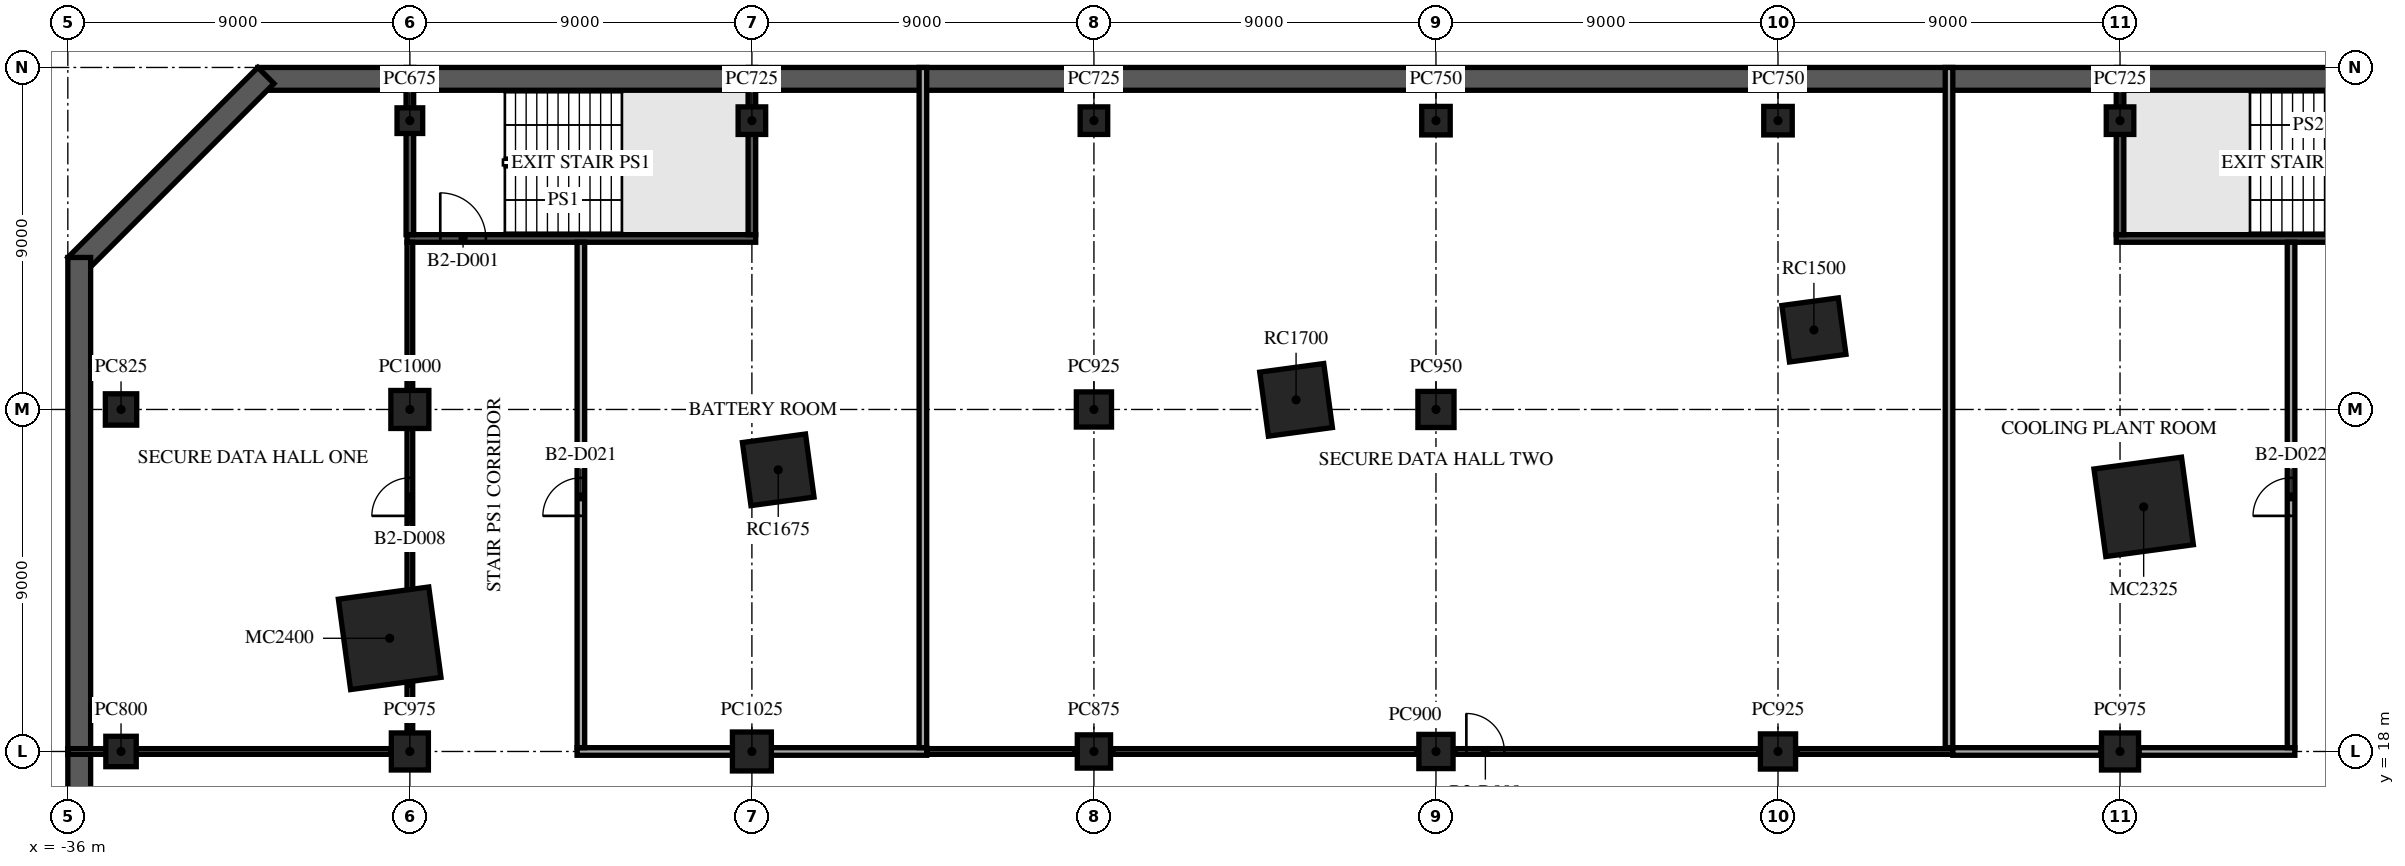
"""IFC4 building model, lengths in metres.
Left out: names, types, materials, properties, quantities, classifications, styles, units other than length and angle.
Written with IfcOpenShell. Run it as: python <this file> out.ifc"""

import sys

from ifc_helpers import new_model, si_unit, direction, frame, frame_2d, origin, origin_2d, place, context, subcontext, project, spatial, rectangle, extrude, element, fill, save


model = new_model("IFC4")
c1 = context("Model", 3, precision=1e-05, world=origin(), true_north=direction((0.0, 1.0)))
c2 = subcontext(c1, "Body", "Model", "MODEL_VIEW")
j1 = project(units=[si_unit("LENGTHUNIT", "METRE"), si_unit("PLANEANGLEUNIT", "RADIAN")], contexts=[c1])
p1 = place(None, origin())
s1 = spatial("IfcSite", under=j1, at=p1, CompositionType="ELEMENT")
p2 = place(p1, origin())
s2 = spatial("IfcBuilding", under=s1, at=p2, CompositionType="ELEMENT")
p3 = place(p2, frame((0.0, 0.0, -9.0)))
s3 = spatial("IfcBuildingStorey", under=s2, at=p3, CompositionType="ELEMENT", Elevation=-9.0)
p4 = place(p3, frame((31.0, 35.7, -0.3), z_axis=(0.0, 0.0, 1.0), x_axis=(-1.0, 0.0, 0.0)))
e1 = element("IfcWall", 1, at=p4, inside=s3, PredefinedType="SOLIDWALL", context=c2, shape_type="SweptSolid", body=[
    extrude(rectangle(XDim=62.0, YDim=0.6, at=frame_2d((31.0, 0.0))), origin(), (0.0, 0.0, 1.0), 4.5),
])
p5 = place(p3, frame((-30.788, 35.788, -0.3), z_axis=(0.0, 0.0, 1.0), x_axis=(-0.707106781187, -0.707106781187, 0.0)))
e2 = element("IfcWall", 2, at=p5, inside=s3, PredefinedType="SOLIDWALL", context=c2, shape_type="SweptSolid", body=[
    extrude(rectangle(XDim=7.071, YDim=0.6, at=frame_2d((3.536, 0.0))), origin(), (0.0, 0.0, 1.0), 4.5),
])
p6 = place(p3, frame((-35.7, 31.0, -0.3), z_axis=(0.0, 0.0, 1.0), x_axis=(0.0, -1.0, 0.0)))
e3 = element("IfcWall", 3, at=p6, inside=s3, PredefinedType="SOLIDWALL", context=c2, shape_type="SweptSolid", body=[
    extrude(rectangle(XDim=62.0, YDim=0.6, at=frame_2d((31.0, 0.0))), origin(), (0.0, 0.0, 1.0), 4.5),
])
p7 = place(p3, frame((-34.6, 18.0, -0.3), z_axis=(0.0, 0.0, 1.0), x_axis=(1.0, 0.0, 0.0)))
e4 = element("IfcColumn", 4, at=p7, inside=s3, PredefinedType="COLUMN", context=c2, shape_type="SweptSolid", body=[
    extrude(rectangle(XDim=0.8, YDim=0.8, at=origin_2d()), origin(), (0.0, 0.0, 1.0), 4.8),
])
p8 = place(p3, frame((-34.6, 27.0, -0.3), z_axis=(0.0, 0.0, 1.0), x_axis=(1.0, 0.0, 0.0)))
e5 = element("IfcColumn", 5, at=p8, inside=s3, PredefinedType="COLUMN", context=c2, shape_type="SweptSolid", body=[
    extrude(rectangle(XDim=0.825, YDim=0.825, at=origin_2d()), origin(), (0.0, 0.0, 1.0), 4.8),
])
p9 = place(p3, frame((-27.0, 18.0, -0.3), z_axis=(0.0, 0.0, 1.0), x_axis=(1.0, 0.0, 0.0)))
e6 = element("IfcColumn", 6, at=p9, inside=s3, PredefinedType="COLUMN", context=c2, shape_type="SweptSolid", body=[
    extrude(rectangle(XDim=0.975, YDim=0.975, at=origin_2d()), origin(), (0.0, 0.0, 1.0), 4.8),
])
p10 = place(p3, frame((-27.0, 27.0, -0.3), z_axis=(0.0, 0.0, 1.0), x_axis=(1.0, 0.0, 0.0)))
e7 = element("IfcColumn", 7, at=p10, inside=s3, PredefinedType="COLUMN", context=c2, shape_type="SweptSolid", body=[
    extrude(rectangle(XDim=1.0, YDim=1.0, at=origin_2d()), origin(), (0.0, 0.0, 1.0), 4.8),
])
p11 = place(p3, frame((-27.0, 34.6, -0.3), z_axis=(0.0, 0.0, 1.0), x_axis=(1.0, 0.0, 0.0)))
e8 = element("IfcColumn", 8, at=p11, inside=s3, PredefinedType="COLUMN", context=c2, shape_type="SweptSolid", body=[
    extrude(rectangle(XDim=0.675, YDim=0.675, at=origin_2d()), origin(), (0.0, 0.0, 1.0), 4.8),
])
p12 = place(p3, frame((-18.0, 18.0, -0.3), z_axis=(0.0, 0.0, 1.0), x_axis=(1.0, 0.0, 0.0)))
e9 = element("IfcColumn", 9, at=p12, inside=s3, PredefinedType="COLUMN", context=c2, shape_type="SweptSolid", body=[
    extrude(rectangle(XDim=1.025, YDim=1.025, at=origin_2d()), origin(), (0.0, 0.0, 1.0), 4.8),
])
p13 = place(p3, frame((-18.0, 34.6, -0.3), z_axis=(0.0, 0.0, 1.0), x_axis=(1.0, 0.0, 0.0)))
e10 = element("IfcColumn", 10, at=p13, inside=s3, PredefinedType="COLUMN", context=c2, shape_type="SweptSolid", body=[
    extrude(rectangle(XDim=0.725, YDim=0.725, at=origin_2d()), origin(), (0.0, 0.0, 1.0), 4.8),
])
p14 = place(p3, frame((-9.0, 18.0, -0.3), z_axis=(0.0, 0.0, 1.0), x_axis=(1.0, 0.0, 0.0)))
e11 = element("IfcColumn", 11, at=p14, inside=s3, PredefinedType="COLUMN", context=c2, shape_type="SweptSolid", body=[
    extrude(rectangle(XDim=0.875, YDim=0.875, at=origin_2d()), origin(), (0.0, 0.0, 1.0), 4.8),
])
p15 = place(p3, frame((-9.0, 27.0, -0.3), z_axis=(0.0, 0.0, 1.0), x_axis=(1.0, 0.0, 0.0)))
e12 = element("IfcColumn", 12, at=p15, inside=s3, PredefinedType="COLUMN", context=c2, shape_type="SweptSolid", body=[
    extrude(rectangle(XDim=0.925, YDim=0.925, at=origin_2d()), origin(), (0.0, 0.0, 1.0), 4.8),
])
p16 = place(p3, frame((-9.0, 34.6, -0.3), z_axis=(0.0, 0.0, 1.0), x_axis=(1.0, 0.0, 0.0)))
e13 = element("IfcColumn", 13, at=p16, inside=s3, PredefinedType="COLUMN", context=c2, shape_type="SweptSolid", body=[
    extrude(rectangle(XDim=0.725, YDim=0.725, at=origin_2d()), origin(), (0.0, 0.0, 1.0), 4.8),
])
p17 = place(p3, frame((0.0, 18.0, -0.3), z_axis=(0.0, 0.0, 1.0), x_axis=(1.0, 0.0, 0.0)))
e14 = element("IfcColumn", 14, at=p17, inside=s3, PredefinedType="COLUMN", context=c2, shape_type="SweptSolid", body=[
    extrude(rectangle(XDim=0.9, YDim=0.9, at=origin_2d()), origin(), (0.0, 0.0, 1.0), 4.8),
])
p18 = place(p3, frame((0.0, 27.0, -0.3), z_axis=(0.0, 0.0, 1.0), x_axis=(1.0, 0.0, 0.0)))
e15 = element("IfcColumn", 15, at=p18, inside=s3, PredefinedType="COLUMN", context=c2, shape_type="SweptSolid", body=[
    extrude(rectangle(XDim=0.95, YDim=0.95, at=origin_2d()), origin(), (0.0, 0.0, 1.0), 4.8),
])
p19 = place(p3, frame((0.0, 34.6, -0.3), z_axis=(0.0, 0.0, 1.0), x_axis=(1.0, 0.0, 0.0)))
e16 = element("IfcColumn", 16, at=p19, inside=s3, PredefinedType="COLUMN", context=c2, shape_type="SweptSolid", body=[
    extrude(rectangle(XDim=0.75, YDim=0.75, at=origin_2d()), origin(), (0.0, 0.0, 1.0), 4.8),
])
p20 = place(p3, frame((9.0, 18.0, -0.3), z_axis=(0.0, 0.0, 1.0), x_axis=(1.0, 0.0, 0.0)))
e17 = element("IfcColumn", 17, at=p20, inside=s3, PredefinedType="COLUMN", context=c2, shape_type="SweptSolid", body=[
    extrude(rectangle(XDim=0.925, YDim=0.925, at=origin_2d()), origin(), (0.0, 0.0, 1.0), 4.8),
])
p21 = place(p3, frame((9.0, 34.6, -0.3), z_axis=(0.0, 0.0, 1.0), x_axis=(1.0, 0.0, 0.0)))
e18 = element("IfcColumn", 18, at=p21, inside=s3, PredefinedType="COLUMN", context=c2, shape_type="SweptSolid", body=[
    extrude(rectangle(XDim=0.75, YDim=0.75, at=origin_2d()), origin(), (0.0, 0.0, 1.0), 4.8),
])
p22 = place(p3, frame((18.0, 18.0, -0.3), z_axis=(0.0, 0.0, 1.0), x_axis=(1.0, 0.0, 0.0)))
e19 = element("IfcColumn", 19, at=p22, inside=s3, PredefinedType="COLUMN", context=c2, shape_type="SweptSolid", body=[
    extrude(rectangle(XDim=0.975, YDim=0.975, at=origin_2d()), origin(), (0.0, 0.0, 1.0), 4.8),
])
p23 = place(p3, frame((18.0, 34.6, -0.3), z_axis=(0.0, 0.0, 1.0), x_axis=(1.0, 0.0, 0.0)))
e20 = element("IfcColumn", 20, at=p23, inside=s3, PredefinedType="COLUMN", context=c2, shape_type="SweptSolid", body=[
    extrude(rectangle(XDim=0.725, YDim=0.725, at=origin_2d()), origin(), (0.0, 0.0, 1.0), 4.8),
])
p24 = place(p3, frame((18.622, 24.437, -0.3), z_axis=(0.0, 0.0, 1.0), x_axis=(0.991001197216, 0.133853005627, 0.0)))
e21 = element("IfcColumn", 21, at=p24, inside=s3, PredefinedType="COLUMN", context=c2, shape_type="SweptSolid", body=[
    extrude(rectangle(XDim=2.325, YDim=2.325, at=origin_2d()), origin(), (0.0, 0.0, 1.0), 4.8),
])
p25 = place(p3, frame((9.945, 29.093, -0.3), z_axis=(0.0, 0.0, 1.0), x_axis=(0.991001197216, 0.133853005627, 0.0)))
e22 = element("IfcColumn", 22, at=p25, inside=s3, PredefinedType="COLUMN", context=c2, shape_type="SweptSolid", body=[
    extrude(rectangle(XDim=1.5, YDim=1.5, at=origin_2d()), origin(), (0.0, 0.0, 1.0), 4.8),
])
p26 = place(p3, frame((-3.681, 27.253, -0.3), z_axis=(0.0, 0.0, 1.0), x_axis=(0.991001197216, 0.133853005627, 0.0)))
e23 = element("IfcColumn", 23, at=p26, inside=s3, PredefinedType="COLUMN", context=c2, shape_type="SweptSolid", body=[
    extrude(rectangle(XDim=1.7, YDim=1.7, at=origin_2d()), origin(), (0.0, 0.0, 1.0), 4.8),
])
p27 = place(p3, frame((-17.307, 25.412, -0.3), z_axis=(0.0, 0.0, 1.0), x_axis=(0.991001197216, 0.133853005627, 0.0)))
e24 = element("IfcColumn", 24, at=p27, inside=s3, PredefinedType="COLUMN", context=c2, shape_type="SweptSolid", body=[
    extrude(rectangle(XDim=1.675, YDim=1.675, at=origin_2d()), origin(), (0.0, 0.0, 1.0), 4.8),
])
p28 = place(p3, frame((-27.531, 20.979, -0.3), z_axis=(0.0, 0.0, 1.0), x_axis=(0.991001197216, 0.133853005627, 0.0)))
e25 = element("IfcColumn", 25, at=p28, inside=s3, PredefinedType="COLUMN", context=c2, shape_type="SweptSolid", body=[
    extrude(rectangle(XDim=2.4, YDim=2.4, at=origin_2d()), origin(), (0.0, 0.0, 1.0), 4.8),
])
p29 = place(p3, frame((-36.0, 18.0, 0.0), z_axis=(0.0, 0.0, 1.0), x_axis=(1.0, 0.0, 0.0)))
e26 = element("IfcWall", 26, at=p29, inside=s3, PredefinedType="PARTITIONING", context=c2, shape_type="SweptSolid", body=[
    extrude(rectangle(XDim=8.5, YDim=0.15, at=frame_2d((4.25, 0.0))), origin(), (0.0, 0.0, 1.0), 4.2),
])
for number, where, z_axis, x_axis in (
    (27, (-22.6, 18.0, 0.0), (0.0, 0.0, 1.0), (1.0, 0.0, 0.0)),
    (28, (-17.5, 18.0, 0.0), (0.0, 0.0, 1.0), (1.0, 0.0, 0.0)),
):
    element("IfcWall", number, at=place(p3, frame(where, z_axis=z_axis, x_axis=x_axis)), inside=s3, PredefinedType="PARTITIONING", context=c2, shape_type="SweptSolid", body=[
        extrude(rectangle(XDim=4.1, YDim=0.2, at=frame_2d((2.05, 0.0))), origin(), (0.0, 0.0, 1.0), 4.2),
    ])
p30 = place(p3, frame((-13.4, 18.0, 0.0), z_axis=(0.0, 0.0, 1.0), x_axis=(1.0, 0.0, 0.0)))
e29 = element("IfcWall", 29, at=p30, inside=s3, PredefinedType="PARTITIONING", context=c2, shape_type="SweptSolid", body=[
    extrude(rectangle(XDim=3.9, YDim=0.15, at=frame_2d((1.95, 0.0))), origin(), (0.0, 0.0, 1.0), 4.2),
])
p31 = place(p3, frame((-8.5, 18.0, 0.0), z_axis=(0.0, 0.0, 1.0), x_axis=(1.0, 0.0, 0.0)))
e30 = element("IfcWall", 30, at=p31, inside=s3, PredefinedType="PARTITIONING", context=c2, shape_type="SweptSolid", body=[
    extrude(rectangle(XDim=8.0, YDim=0.15, at=frame_2d((4.0, 0.0))), origin(), (0.0, 0.0, 1.0), 4.2),
])
p32 = place(p3, frame((0.5, 18.0, 0.0), z_axis=(0.0, 0.0, 1.0), x_axis=(1.0, 0.0, 0.0)))
e31 = element("IfcWall", 31, at=p32, inside=s3, PredefinedType="PARTITIONING", context=c2, shape_type="SweptSolid", body=[
    extrude(rectangle(XDim=8.0, YDim=0.15, at=frame_2d((4.0, 0.0))), origin(), (0.0, 0.0, 1.0), 4.2),
])
p33 = place(p32, frame((0.3, 0.0, 0.0)))
e32 = element("IfcOpeningElement", 32, at=p33, cuts=e31, PredefinedType="OPENING", context=c2, shape_type="SweptSolid", body=[
    extrude(rectangle(XDim=1.0, YDim=2.1, at=frame_2d((0.5, 1.05))), frame((0.0, 0.085, 0.0), z_axis=(0.0, -1.0, 0.0), x_axis=(1.0, 0.0, 0.0)), (0.0, 0.0, 1.0), 0.17),
])
p34 = place(p3, frame((9.5, 18.0, 0.0), z_axis=(0.0, 0.0, 1.0), x_axis=(1.0, 0.0, 0.0)))
e33 = element("IfcWall", 33, at=p34, inside=s3, PredefinedType="PARTITIONING", context=c2, shape_type="SweptSolid", body=[
    extrude(rectangle(XDim=4.1, YDim=0.15, at=frame_2d((2.05, 0.0))), origin(), (0.0, 0.0, 1.0), 4.2),
])
p35 = place(p3, frame((13.6, 18.0, 0.0), z_axis=(0.0, 0.0, 1.0), x_axis=(1.0, 0.0, 0.0)))
e34 = element("IfcWall", 34, at=p35, inside=s3, PredefinedType="PARTITIONING", context=c2, shape_type="SweptSolid", body=[
    extrude(rectangle(XDim=3.9, YDim=0.2, at=frame_2d((1.95, 0.0))), origin(), (0.0, 0.0, 1.0), 4.2),
])
p36 = place(p3, frame((18.5, 18.0, 0.0), z_axis=(0.0, 0.0, 1.0), x_axis=(1.0, 0.0, 0.0)))
e35 = element("IfcWall", 35, at=p36, inside=s3, PredefinedType="PARTITIONING", context=c2, shape_type="SweptSolid", body=[
    extrude(rectangle(XDim=4.1, YDim=0.2, at=frame_2d((2.05, 0.0))), origin(), (0.0, 0.0, 1.0), 4.2),
])
p37 = place(p3, frame((-27.075, 31.5, 0.0), z_axis=(0.0, 0.0, 1.0), x_axis=(1.0, 0.0, 0.0)))
e36 = element("IfcWall", 36, at=p37, inside=s3, PredefinedType="PARTITIONING", context=c2, shape_type="SweptSolid", body=[
    extrude(rectangle(XDim=9.175, YDim=0.2, at=frame_2d((4.587, 0.0))), origin(), (0.0, 0.0, 1.0), 4.2),
])
p38 = place(p37, frame((0.875, 0.0, 0.0)))
e37 = element("IfcOpeningElement", 37, at=p38, cuts=e36, PredefinedType="OPENING", context=c2, shape_type="SweptSolid", body=[
    extrude(rectangle(XDim=1.2, YDim=2.1, at=frame_2d((0.6, 1.05))), frame((0.0, 0.11, 0.0), z_axis=(0.0, -1.0, 0.0), x_axis=(1.0, 0.0, 0.0)), (0.0, 0.0, 1.0), 0.22),
])
p39 = place(p3, frame((17.9, 31.5, 0.0), z_axis=(0.0, 0.0, 1.0), x_axis=(1.0, 0.0, 0.0)))
e38 = element("IfcWall", 38, at=p39, inside=s3, PredefinedType="PARTITIONING", context=c2, shape_type="SweptSolid", body=[
    extrude(rectangle(XDim=9.175, YDim=0.2, at=frame_2d((4.587, 0.0))), origin(), (0.0, 0.0, 1.0), 4.2),
])
p40 = place(p39, frame((7.1, 0.0, 0.0)))
e39 = element("IfcOpeningElement", 39, at=p40, cuts=e38, PredefinedType="OPENING", context=c2, shape_type="SweptSolid", body=[
    extrude(rectangle(XDim=1.2, YDim=2.1, at=frame_2d((0.6, 1.05))), frame((0.0, 0.11, 0.0), z_axis=(0.0, -1.0, 0.0), x_axis=(1.0, 0.0, 0.0)), (0.0, 0.0, 1.0), 0.22),
])
p41 = place(p3, frame((-27.0, 18.5, 0.0), z_axis=(0.0, 0.0, 1.0), x_axis=(0.0, 1.0, 0.0)))
e40 = element("IfcWall", 40, at=p41, inside=s3, PredefinedType="PARTITIONING", context=c2, shape_type="SweptSolid", body=[
    extrude(rectangle(XDim=1.242, YDim=0.15, at=frame_2d((0.621, 0.0))), origin(), (0.0, 0.0, 1.0), 4.2),
])
p42 = place(p3, frame((-27.0, 22.216, 0.0), z_axis=(0.0, 0.0, 1.0), x_axis=(0.0, 1.0, 0.0)))
e41 = element("IfcWall", 41, at=p42, inside=s3, PredefinedType="PARTITIONING", context=c2, shape_type="SweptSolid", body=[
    extrude(rectangle(XDim=4.284, YDim=0.15, at=frame_2d((2.142, 0.0))), origin(), (0.0, 0.0, 1.0), 4.2),
])
p43 = place(p42, frame((1.984, 0.0, 0.0)))
e42 = element("IfcOpeningElement", 42, at=p43, cuts=e41, PredefinedType="OPENING", context=c2, shape_type="SweptSolid", body=[
    extrude(rectangle(XDim=1.0, YDim=2.1, at=frame_2d((0.5, 1.05))), frame((0.0, 0.085, 0.0), z_axis=(0.0, -1.0, 0.0), x_axis=(1.0, 0.0, 0.0)), (0.0, 0.0, 1.0), 0.17),
])
p44 = place(p3, frame((-27.0, 27.5, 0.0), z_axis=(0.0, 0.0, 1.0), x_axis=(0.0, 1.0, 0.0)))
e43 = element("IfcWall", 43, at=p44, inside=s3, PredefinedType="PARTITIONING", context=c2, shape_type="SweptSolid", body=[
    extrude(rectangle(XDim=3.9, YDim=0.15, at=frame_2d((1.95, 0.0))), origin(), (0.0, 0.0, 1.0), 4.2),
])
p45 = place(p3, frame((-27.0, 31.6, 0.0), z_axis=(0.0, 0.0, 1.0), x_axis=(0.0, 1.0, 0.0)))
e44 = element("IfcWall", 44, at=p45, inside=s3, PredefinedType="PARTITIONING", context=c2, shape_type="SweptSolid", body=[
    extrude(rectangle(XDim=4.4, YDim=0.2, at=frame_2d((2.2, 0.0))), origin(), (0.0, 0.0, 1.0), 4.2),
])
p46 = place(p3, frame((-22.5, 18.1, 0.0), z_axis=(0.0, 0.0, 1.0), x_axis=(0.0, 1.0, 0.0)))
e45 = element("IfcWall", 45, at=p46, inside=s3, PredefinedType="PARTITIONING", context=c2, shape_type="SweptSolid", body=[
    extrude(rectangle(XDim=13.3, YDim=0.2, at=frame_2d((6.65, 0.0))), origin(), (0.0, 0.0, 1.0), 4.2),
])
p47 = place(p46, frame((6.1, 0.0, 0.0)))
e46 = element("IfcOpeningElement", 46, at=p47, cuts=e45, PredefinedType="OPENING", context=c2, shape_type="SweptSolid", body=[
    extrude(rectangle(XDim=1.0, YDim=2.1, at=frame_2d((0.5, 1.05))), frame((0.0, 0.11, 0.0), z_axis=(0.0, -1.0, 0.0), x_axis=(1.0, 0.0, 0.0)), (0.0, 0.0, 1.0), 0.22),
])
p48 = place(p3, frame((-18.0, 31.6, 0.0), z_axis=(0.0, 0.0, 1.0), x_axis=(0.0, 1.0, 0.0)))
e47 = element("IfcWall", 47, at=p48, inside=s3, PredefinedType="PARTITIONING", context=c2, shape_type="SweptSolid", body=[
    extrude(rectangle(XDim=4.4, YDim=0.2, at=frame_2d((2.2, 0.0))), origin(), (0.0, 0.0, 1.0), 4.2),
])
for number, where, z_axis, x_axis in (
    (48, (-13.5, 18.1, 0.0), (0.0, 0.0, 1.0), (0.0, 1.0, 0.0)),
    (49, (13.5, 18.1, 0.0), (0.0, 0.0, 1.0), (0.0, 1.0, 0.0)),
):
    element("IfcWall", number, at=place(p3, frame(where, z_axis=z_axis, x_axis=x_axis)), inside=s3, PredefinedType="PARTITIONING", context=c2, shape_type="SweptSolid", body=[
        extrude(rectangle(XDim=17.9, YDim=0.2, at=frame_2d((8.95, 0.0))), origin(), (0.0, 0.0, 1.0), 4.2),
    ])
p49 = place(p3, frame((18.0, 31.6, 0.0), z_axis=(0.0, 0.0, 1.0), x_axis=(0.0, 1.0, 0.0)))
e50 = element("IfcWall", 50, at=p49, inside=s3, PredefinedType="PARTITIONING", context=c2, shape_type="SweptSolid", body=[
    extrude(rectangle(XDim=4.4, YDim=0.2, at=frame_2d((2.2, 0.0))), origin(), (0.0, 0.0, 1.0), 4.2),
])
p50 = place(p3, frame((22.5, 18.1, 0.0), z_axis=(0.0, 0.0, 1.0), x_axis=(0.0, 1.0, 0.0)))
e51 = element("IfcWall", 51, at=p50, inside=s3, PredefinedType="PARTITIONING", context=c2, shape_type="SweptSolid", body=[
    extrude(rectangle(XDim=13.3, YDim=0.2, at=frame_2d((6.65, 0.0))), origin(), (0.0, 0.0, 1.0), 4.2),
])
p51 = place(p50, frame((6.1, 0.0, 0.0)))
e52 = element("IfcOpeningElement", 52, at=p51, cuts=e51, PredefinedType="OPENING", context=c2, shape_type="SweptSolid", body=[
    extrude(rectangle(XDim=1.0, YDim=2.1, at=frame_2d((0.5, 1.05))), frame((0.0, 0.11, 0.0), z_axis=(0.0, -1.0, 0.0), x_axis=(1.0, 0.0, 0.0)), (0.0, 0.0, 1.0), 0.22),
])
p52 = place(p38, origin())
e53 = element("IfcDoor", 53, at=p52, inside=s3, OperationType="SINGLE_SWING_LEFT", PredefinedType="DOOR", context=c2, shape_type="SweptSolid", body=[
    extrude(rectangle(XDim=1.2, YDim=2.1, at=frame_2d((0.6, 1.05))), frame((0.0, 0.025, 0.0), z_axis=(0.0, -1.0, 0.0), x_axis=(1.0, 0.0, 0.0)), (0.0, 0.0, 1.0), 0.05),
])
fill(e37, e53)
p53 = place(p43, origin())
e54 = element("IfcDoor", 54, at=p53, inside=s3, OperationType="SINGLE_SWING_RIGHT", PredefinedType="DOOR", context=c2, shape_type="SweptSolid", body=[
    extrude(rectangle(XDim=1.0, YDim=2.1, at=frame_2d((0.5, 1.05))), frame((0.0, 0.025, 0.0), z_axis=(0.0, -1.0, 0.0), x_axis=(1.0, 0.0, 0.0)), (0.0, 0.0, 1.0), 0.05),
])
fill(e42, e54)
p54 = place(p33, origin())
e55 = element("IfcDoor", 55, at=p54, inside=s3, OperationType="SINGLE_SWING_LEFT", PredefinedType="DOOR", context=c2, shape_type="SweptSolid", body=[
    extrude(rectangle(XDim=1.0, YDim=2.1, at=frame_2d((0.5, 1.05))), frame((0.0, 0.025, 0.0), z_axis=(0.0, -1.0, 0.0), x_axis=(1.0, 0.0, 0.0)), (0.0, 0.0, 1.0), 0.05),
])
fill(e32, e55)
p55 = place(p47, origin())
e56 = element("IfcDoor", 56, at=p55, inside=s3, OperationType="SINGLE_SWING_LEFT", PredefinedType="DOOR", context=c2, shape_type="SweptSolid", body=[
    extrude(rectangle(XDim=1.0, YDim=2.1, at=frame_2d((0.5, 1.05))), frame((0.0, 0.025, 0.0), z_axis=(0.0, -1.0, 0.0), x_axis=(1.0, 0.0, 0.0)), (0.0, 0.0, 1.0), 0.05),
])
fill(e46, e56)
p56 = place(p51, origin())
e57 = element("IfcDoor", 57, at=p56, inside=s3, OperationType="SINGLE_SWING_RIGHT", PredefinedType="DOOR", context=c2, shape_type="SweptSolid", body=[
    extrude(rectangle(XDim=1.0, YDim=2.1, at=frame_2d((0.5, 1.05))), frame((0.0, 0.025, 0.0), z_axis=(0.0, -1.0, 0.0), x_axis=(1.0, 0.0, 0.0)), (0.0, 0.0, 1.0), 0.05),
])
fill(e52, e57)
save(model, sys.argv[1])
